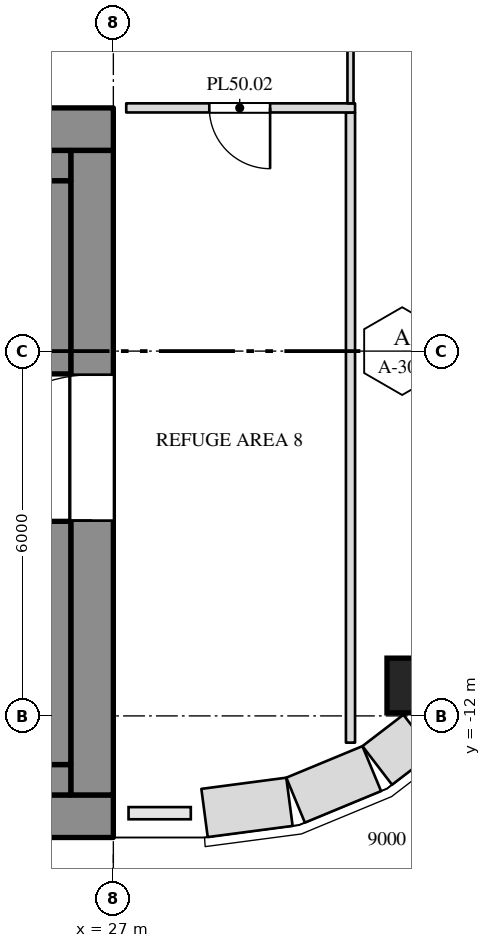
"""IFC4 building model, lengths in metres.
Left out: names, types, materials, properties, quantities, classifications, styles, units other than length and angle.
Written with IfcOpenShell. Run it as: python <this file> out.ifc"""

import sys

from ifc_helpers import new_model, si_unit, direction, frame, frame_2d, origin, origin_2d, place, context, subcontext, project, spatial, rectangle, extrude, element, fill, save


model = new_model("IFC4")
c1 = context("Model", 3, precision=1e-05, world=origin(), true_north=direction((0.0, 1.0)))
c2 = subcontext(c1, "Body", "Model", "MODEL_VIEW")
j1 = project(units=[si_unit("LENGTHUNIT", "METRE"), si_unit("PLANEANGLEUNIT", "RADIAN")], contexts=[c1])
p1 = place(None, origin())
s1 = spatial("IfcSite", under=j1, at=p1, CompositionType="ELEMENT")
p2 = place(p1, origin())
s2 = spatial("IfcBuilding", under=s1, at=p2, CompositionType="ELEMENT")
p3 = place(p2, frame((0.0, 0.0, 216.5)))
s3 = spatial("IfcBuildingStorey", under=s2, at=p3, CompositionType="ELEMENT", Elevation=216.5)
p4 = place(p3, frame((31.95, -11.5, 0.0), z_axis=(0.0, 0.0, 1.0), x_axis=(1.0, 0.0, 0.0)))
e1 = element("IfcColumn", 1, at=p4, inside=s3, PredefinedType="COLUMN", context=c2, shape_type="SweptSolid", body=[
    extrude(rectangle(XDim=0.9, YDim=0.9, at=origin_2d()), origin(), (0.0, 0.0, 1.0), 4.0),
])
p5 = place(p3, frame((-27.0, -2.35, 0.0), z_axis=(0.0, 0.0, 1.0), x_axis=(1.0, 0.0, 0.0)))
e2 = element("IfcWall", 2, at=p5, inside=s3, PredefinedType="SHEAR", context=c2, shape_type="SweptSolid", body=[
    extrude(rectangle(XDim=54.0, YDim=0.7, at=frame_2d((27.0, 0.0))), origin(), (0.0, 0.0, 1.0), 3.8),
])
p6 = place(p5, frame((15.15, 0.0, 0.0)))
e3 = element("IfcOpeningElement", 3, at=p6, cuts=e2, PredefinedType="OPENING", context=c2, shape_type="SweptSolid", body=[
    extrude(rectangle(XDim=2.4, YDim=2.1, at=frame_2d((1.2, 1.05))), frame((0.0, 0.362, 0.0), z_axis=(0.0, -1.0, 0.0), x_axis=(1.0, 0.0, 0.0)), (0.0, 0.0, 1.0), 0.724),
])
p7 = place(p5, frame((36.45, 0.0, 0.0)))
e4 = element("IfcOpeningElement", 4, at=p7, cuts=e2, PredefinedType="OPENING", context=c2, shape_type="SweptSolid", body=[
    extrude(rectangle(XDim=2.4, YDim=2.1, at=frame_2d((1.2, 1.05))), frame((0.0, 0.362, 0.0), z_axis=(0.0, -1.0, 0.0), x_axis=(1.0, 0.0, 0.0)), (0.0, 0.0, 1.0), 0.724),
])
p8 = place(p3, frame((-27.0, -13.65, 0.0), z_axis=(0.0, 0.0, 1.0), x_axis=(1.0, 0.0, 0.0)))
e5 = element("IfcWall", 5, at=p8, inside=s3, PredefinedType="SHEAR", context=c2, shape_type="SweptSolid", body=[
    extrude(rectangle(XDim=54.0, YDim=0.7, at=frame_2d((27.0, 0.0))), origin(), (0.0, 0.0, 1.0), 3.8),
])
p9 = place(p3, frame((26.65, -13.3, 0.0), z_axis=(0.0, 0.0, 1.0), x_axis=(0.0, 1.0, 0.0)))
e6 = element("IfcWall", 6, at=p9, inside=s3, PredefinedType="SHEAR", context=c2, shape_type="SweptSolid", body=[
    extrude(rectangle(XDim=10.6, YDim=0.7, at=frame_2d((5.3, 0.0))), origin(), (0.0, 0.0, 1.0), 3.8),
])
p10 = place(p9, frame((4.512, 0.0, 0.0)))
e7 = element("IfcOpeningElement", 7, at=p10, cuts=e6, PredefinedType="OPENING", context=c2, shape_type="SweptSolid", body=[
    extrude(rectangle(XDim=2.4, YDim=2.1, at=frame_2d((1.2, 1.05))), frame((0.0, 0.362, 0.0), z_axis=(0.0, -1.0, 0.0), x_axis=(1.0, 0.0, 0.0)), (0.0, 0.0, 1.0), 0.724),
])
p11 = place(p3, frame((12.0, -2.95, 0.0), z_axis=(0.0, 0.0, 1.0), x_axis=(1.0, 0.0, 0.0)))
e8 = element("IfcWall", 8, at=p11, inside=s3, PredefinedType="SHEAR", context=c2, shape_type="SweptSolid", body=[
    extrude(rectangle(XDim=14.3, YDim=0.5, at=frame_2d((7.15, 0.0))), origin(), (0.0, 0.0, 1.0), 3.8),
])
p12 = place(p3, frame((-26.3, -13.05, 0.0), z_axis=(0.0, 0.0, 1.0), x_axis=(1.0, 0.0, 0.0)))
e9 = element("IfcWall", 9, at=p12, inside=s3, PredefinedType="SHEAR", context=c2, shape_type="SweptSolid", body=[
    extrude(rectangle(XDim=52.6, YDim=0.5, at=frame_2d((26.3, 0.0))), origin(), (0.0, 0.0, 1.0), 3.8),
])
p13 = place(p3, frame((26.05, -12.8, 0.0), z_axis=(0.0, 0.0, 1.0), x_axis=(0.0, 1.0, 0.0)))
e10 = element("IfcWall", 10, at=p13, inside=s3, PredefinedType="SHEAR", context=c2, shape_type="SweptSolid", body=[
    extrude(rectangle(XDim=4.0, YDim=0.5, at=frame_2d((2.0, 0.0))), origin(), (0.0, 0.0, 1.0), 3.8),
])
p14 = place(p3, frame((26.05, -6.375, 0.0), z_axis=(0.0, 0.0, 1.0), x_axis=(0.0, 1.0, 0.0)))
e11 = element("IfcWall", 11, at=p14, inside=s3, PredefinedType="SHEAR", context=c2, shape_type="SweptSolid", body=[
    extrude(rectangle(XDim=3.175, YDim=0.5, at=frame_2d((1.587, 0.0))), origin(), (0.0, 0.0, 1.0), 3.8),
])
p15 = place(p3, frame((30.9, -12.44, 0.0), z_axis=(0.0, 0.0, 1.0), x_axis=(0.0, 1.0, 0.0)))
e12 = element("IfcWall", 12, at=p15, inside=s3, PredefinedType="PARTITIONING", context=c2, shape_type="SweptSolid", body=[
    extrude(rectangle(XDim=10.365, YDim=0.15, at=frame_2d((5.183, 0.0))), origin(), (0.0, 0.0, 1.0), 3.8),
])
p16 = place(p3, frame((27.212, -2.0, 0.0), z_axis=(0.0, 0.0, 1.0), x_axis=(1.0, 0.0, 0.0)))
e13 = element("IfcWall", 13, at=p16, inside=s3, PredefinedType="PARTITIONING", context=c2, shape_type="SweptSolid", body=[
    extrude(rectangle(XDim=3.763, YDim=0.15, at=frame_2d((1.882, 0.0))), origin(), (0.0, 0.0, 1.0), 3.8),
])
p17 = place(p16, frame((1.366, 0.0, 0.0)))
e14 = element("IfcOpeningElement", 14, at=p17, cuts=e13, PredefinedType="OPENING", context=c2, shape_type="SweptSolid", body=[
    extrude(rectangle(XDim=1.0, YDim=2.1, at=frame_2d((0.5, 1.05))), frame((0.0, 0.087, 0.0), z_axis=(0.0, -1.0, 0.0), x_axis=(1.0, 0.0, 0.0)), (0.0, 0.0, 1.0), 0.174),
])
p18 = place(p3, frame((30.9, -1.925, 0.0), z_axis=(0.0, 0.0, 1.0), x_axis=(0.0, 1.0, 0.0)))
e15 = element("IfcWall", 15, at=p18, inside=s3, PredefinedType="PARTITIONING", context=c2, shape_type="SweptSolid", body=[
    extrude(rectangle(XDim=2.25, YDim=0.1, at=frame_2d((1.125, 0.0))), origin(), (0.0, 0.0, 1.0), 3.8),
])
p19 = place(p3, frame((28.5, -13.597, 0.0), z_axis=(0.0, 0.0, 1.0), x_axis=(0.99144603414, 0.130517283865, 0.0)))
e16 = element("IfcWall", 16, at=p19, inside=s3, PredefinedType="SOLIDWALL", context=c2, shape_type="SweptSolid", body=[
    extrude(rectangle(XDim=1.408, YDim=0.8, at=frame_2d((0.704, 0.0))), origin(), (0.0, 0.0, 1.0), 3.8),
])
p20 = place(p3, frame((29.997, -13.386, 0.0), z_axis=(0.0, 0.0, 1.0), x_axis=(0.923847774587, 0.38276009378, 0.0)))
e17 = element("IfcWall", 17, at=p20, inside=s3, PredefinedType="SOLIDWALL", context=c2, shape_type="SweptSolid", body=[
    extrude(rectangle(XDim=1.355, YDim=0.8, at=frame_2d((0.678, 0.0))), origin(), (0.0, 0.0, 1.0), 3.8),
])
p21 = place(p3, frame((31.34, -12.815, 0.0), z_axis=(0.0, 0.0, 1.0), x_axis=(0.793361000707, 0.608751445631, 0.0)))
e18 = element("IfcWall", 18, at=p21, inside=s3, PredefinedType="SOLIDWALL", context=c2, shape_type="SweptSolid", body=[
    extrude(rectangle(XDim=0.849, YDim=0.8, at=frame_2d((0.425, 0.0))), origin(), (0.0, 0.0, 1.0), 3.8),
])
p22 = place(p17, origin())
e19 = element("IfcDoor", 19, at=p22, inside=s3, OperationType="SINGLE_SWING_LEFT", PredefinedType="DOOR", context=c2, shape_type="SweptSolid", body=[
    extrude(rectangle(XDim=1.0, YDim=2.1, at=frame_2d((0.5, 1.05))), frame((0.0, 0.025, 0.0), z_axis=(0.0, -1.0, 0.0), x_axis=(1.0, 0.0, 0.0)), (0.0, 0.0, 1.0), 0.05),
])
fill(e14, e19)
p23 = place(p10, origin())
e20 = element("IfcDoor", 20, at=p23, inside=s3, OperationType="DOUBLE_DOOR_SINGLE_SWING", PredefinedType="DOOR", context=c2, shape_type="SweptSolid", body=[
    extrude(rectangle(XDim=2.4, YDim=2.1, at=frame_2d((1.2, 1.05))), frame((0.0, 0.025, 0.0), z_axis=(0.0, -1.0, 0.0), x_axis=(1.0, 0.0, 0.0)), (0.0, 0.0, 1.0), 0.05),
])
fill(e7, e20)
save(model, sys.argv[1])
